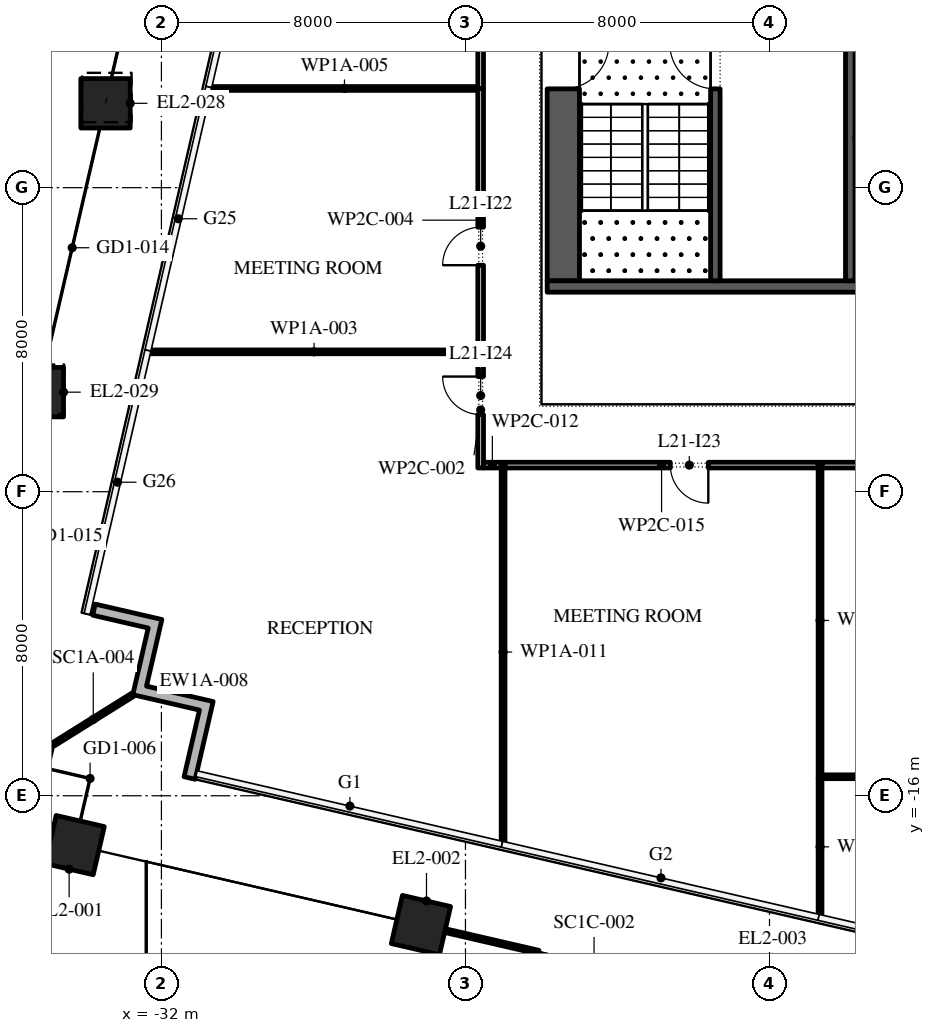
"""IFC4 building model, lengths in metres.
Left out: names, types, materials, properties, quantities, classifications, styles, units other than length and angle.
Written with IfcOpenShell. Run it as: python <this file> out.ifc"""

import sys

from ifc_helpers import new_model, si_unit, direction, frame, frame_2d, origin, origin_2d, place, context, subcontext, project, spatial, polyline, rectangle, outline, extrude, element, fill, save


model = new_model("IFC4")
c1 = context("Model", 3, precision=1e-05, world=origin(), true_north=direction((0.0, 1.0)))
c2 = subcontext(c1, "Body", "Model", "MODEL_VIEW")
j1 = project(units=[si_unit("LENGTHUNIT", "METRE"), si_unit("PLANEANGLEUNIT", "RADIAN")], contexts=[c1])
p1 = place(None, origin())
s1 = spatial("IfcSite", under=j1, at=p1, CompositionType="ELEMENT")
p2 = place(p1, origin())
s2 = spatial("IfcBuilding", under=s1, at=p2, CompositionType="ELEMENT")
p3 = place(p2, frame((0.0, 0.0, 99.6)))
s3 = spatial("IfcBuildingStorey", under=s2, at=p3, CompositionType="ELEMENT", Elevation=99.6)
for number, where, z_axis, x_axis in (
    (1, (-34.282, -17.298, 0.0), (0.0, 0.0, 1.0), (0.974, -0.225, 0.0)),
    (2, (-25.172, -19.402, 0.0), (0.0, 0.0, 1.0), (0.974, -0.225, 0.0)),
):
    element("IfcColumn", number, at=place(p3, frame(where, z_axis=z_axis, x_axis=x_axis)), inside=s3, PredefinedType="COLUMN", context=c2, shape_type="SweptSolid", body=[
        extrude(rectangle(XDim=1.3, YDim=1.3, at=origin_2d()), origin(), (0.0, 0.0, 1.0), 6.0),
    ])
p4 = place(p3, frame((-33.471, 2.219, 0.0), z_axis=(0.005816723784, 0.025300714639, 0.999662962985), x_axis=(-0.974575718587, 0.224058404755, 0.0)))
e3 = element("IfcColumn", 3, at=p4, inside=s3, PredefinedType="COLUMN", context=c2, shape_type="SweptSolid", body=[
    extrude(rectangle(XDim=1.3, YDim=1.3, at=origin_2d()), origin(), (0.0, 0.0, 1.0), 6.002),
])
p5 = place(p3, frame((-35.225, -5.381, 0.0), z_axis=(0.002929440379, 0.012653554971, 0.999915649405), x_axis=(-0.974232565058, 0.225545802843, 0.0)))
e4 = element("IfcColumn", 4, at=p5, inside=s3, PredefinedType="COLUMN", context=c2, shape_type="SweptSolid", body=[
    extrude(rectangle(XDim=1.3, YDim=1.3, at=origin_2d()), origin(), (0.0, 0.0, 1.0), 6.0),
])
p6 = place(p3, frame((-35.631, -15.139, 0.0), z_axis=(0.0, 0.0, 1.0), x_axis=(0.974370064785, -0.224951054344, 0.0)))
e5 = element("IfcColumn", 5, at=p6, inside=s3, PredefinedType="COLUMN", context=c2, shape_type="SweptSolid", body=[
    extrude(rectangle(XDim=1.3, YDim=1.3, at=origin_2d()), origin(), (0.0, 0.0, 1.0), 6.0),
])
p7 = place(p3, origin())
e6 = element("IfcWall", 6, at=p7, inside=s3, PredefinedType="STANDARD", context=c2, shape_type="SweptSolid", body=[
    extrude(outline(polyline([(-32.393, -13.116), (-30.639, -13.521), (-31.111, -15.567), (-31.404, -15.5), (-30.999, -13.746), (-32.753, -13.341), (-32.348, -11.587), (-33.809, -11.25), (-33.742, -10.957), (-31.988, -11.362), (-32.393, -13.116)])), origin(), (0.0, 0.0, 1.0), 5.8),
])
p8 = place(p3, frame((-32.753, -13.341, 0.0), z_axis=(0.0, 0.0, 1.0), x_axis=(-0.848059759764, -0.529900598103, 0.0)))
e7 = element("IfcWall", 7, at=p8, inside=s3, PredefinedType="STANDARD", context=c2, shape_type="SweptSolid", body=[
    extrude(rectangle(XDim=2.455, YDim=0.1, at=frame_2d((1.228, 0.0))), origin(), (0.0, 0.0, 1.0), 5.8),
])
p9 = place(p3, frame((-24.519, -19.552, 0.0), z_axis=(0.0, 0.0, 1.0), x_axis=(0.974372699143, -0.224939643383, 0.0)))
e8 = element("IfcWall", 8, at=p9, inside=s3, PredefinedType="STANDARD", context=c2, shape_type="SweptSolid", body=[
    extrude(rectangle(XDim=8.01, YDim=0.1, at=frame_2d((4.005, 0.0))), origin(), (0.0, 0.0, 1.0), 4.85),
])
p10 = place(p9, frame((2.505, 0.0, 0.0)))
e9 = element("IfcOpeningElement", 9, at=p10, cuts=e8, PredefinedType="OPENING", context=c2, shape_type="SweptSolid", body=[
    extrude(rectangle(XDim=3.0, YDim=3.5, at=frame_2d((1.5, 1.75))), frame((0.0, 0.06, 0.0), z_axis=(0.0, -1.0, 0.0), x_axis=(1.0, 0.0, 0.0)), (0.0, 0.0, 1.0), 0.12),
])
p11 = place(p3, frame((-21.425, -2.45, 0.0), z_axis=(0.0, 0.0, 1.0), x_axis=(0.0, 1.0, 0.0)))
e10 = element("IfcWall", 10, at=p11, inside=s3, PredefinedType="SHEAR", context=c2, shape_type="SweptSolid", body=[
    extrude(rectangle(XDim=27.9, YDim=0.85, at=frame_2d((13.95, 0.0))), origin(), (0.0, 0.0, 1.0), 5.8),
])
p12 = place(p11, frame((5.05, 0.0, 0.0)))
e11 = element("IfcOpeningElement", 11, at=p12, cuts=e10, PredefinedType="OPENING", context=c2, shape_type="SweptSolid", body=[
    extrude(rectangle(XDim=1.2, YDim=2.1, at=frame_2d((0.6, 1.05))), frame((0.0, 0.435, 0.0), z_axis=(0.0, -1.0, 0.0), x_axis=(1.0, 0.0, 0.0)), (0.0, 0.0, 1.0), 0.87),
])
p13 = place(p11, frame((21.65, 0.0, 0.0)))
e12 = element("IfcOpeningElement", 12, at=p13, cuts=e10, PredefinedType="OPENING", context=c2, shape_type="SweptSolid", body=[
    extrude(rectangle(XDim=1.2, YDim=2.1, at=frame_2d((0.6, 1.05))), frame((0.0, 0.435, 0.0), z_axis=(0.0, -1.0, 0.0), x_axis=(1.0, 0.0, 0.0)), (0.0, 0.0, 1.0), 0.87),
])
p14 = place(p3, frame((-21.85, -2.6, 0.0), z_axis=(0.0, 0.0, 1.0), x_axis=(1.0, 0.0, 0.0)))
e13 = element("IfcWall", 13, at=p14, inside=s3, PredefinedType="SHEAR", context=c2, shape_type="SweptSolid", body=[
    extrude(rectangle(XDim=11.7, YDim=0.3, at=frame_2d((5.85, 0.0))), origin(), (0.0, 0.0, 1.0), 5.8),
])
p15 = place(p3, frame((-17.425, -2.45, 0.0), z_axis=(0.0, 0.0, 1.0), x_axis=(0.0, 1.0, 0.0)))
e14 = element("IfcWall", 14, at=p15, inside=s3, PredefinedType="SHEAR", context=c2, shape_type="SweptSolid", body=[
    extrude(rectangle(XDim=6.3, YDim=0.25, at=frame_2d((3.15, 0.0))), origin(), (0.0, 0.0, 1.0), 5.8),
])
p16 = place(p15, frame((5.05, 0.0, 0.0)))
e15 = element("IfcOpeningElement", 15, at=p16, cuts=e14, PredefinedType="OPENING", context=c2, shape_type="SweptSolid", body=[
    extrude(rectangle(XDim=1.2, YDim=2.1, at=frame_2d((0.6, 1.05))), frame((0.0, 0.135, 0.0), z_axis=(0.0, -1.0, 0.0), x_axis=(1.0, 0.0, 0.0)), (0.0, 0.0, 1.0), 0.27),
])
p17 = place(p3, frame((-13.875, -2.45, 0.0), z_axis=(0.0, 0.0, 1.0), x_axis=(0.0, 1.0, 0.0)))
e16 = element("IfcWall", 16, at=p17, inside=s3, PredefinedType="SHEAR", context=c2, shape_type="SweptSolid", body=[
    extrude(rectangle(XDim=21.3, YDim=0.25, at=frame_2d((10.65, 0.0))), origin(), (0.0, 0.0, 1.0), 5.8),
])
p18 = place(p17, frame((11.446, 0.0, 0.0)))
e17 = element("IfcOpeningElement", 17, at=p18, cuts=e16, PredefinedType="OPENING", context=c2, shape_type="SweptSolid", body=[
    extrude(rectangle(XDim=0.9, YDim=2.1, at=frame_2d((0.45, 1.05))), frame((0.0, 0.135, 0.0), z_axis=(0.0, -1.0, 0.0), x_axis=(1.0, 0.0, 0.0)), (0.0, 0.0, 1.0), 0.27),
])
p19 = place(p17, frame((17.725, 0.0, 0.0)))
e18 = element("IfcOpeningElement", 18, at=p19, cuts=e16, PredefinedType="OPENING", context=c2, shape_type="SweptSolid", body=[
    extrude(rectangle(XDim=0.9, YDim=2.1, at=frame_2d((0.45, 1.05))), frame((0.0, 0.135, 0.0), z_axis=(0.0, -1.0, 0.0), x_axis=(1.0, 0.0, 0.0)), (0.0, 0.0, 1.0), 0.27),
])
p20 = place(p17, frame((6.971, 0.0, 0.0)))
e19 = element("IfcOpeningElement", 19, at=p20, cuts=e16, PredefinedType="OPENING", context=c2, shape_type="SweptSolid", body=[
    extrude(rectangle(XDim=1.1, YDim=2.1, at=frame_2d((0.55, 1.05))), frame((0.0, 0.135, 0.0), z_axis=(0.0, -1.0, 0.0), x_axis=(1.0, 0.0, 0.0)), (0.0, 0.0, 1.0), 0.27),
])
p21 = place(p3, frame((-13.75, 1.3, 0.0), z_axis=(0.0, 0.0, 1.0), x_axis=(1.0, 0.0, 0.0)))
e20 = element("IfcWall", 20, at=p21, inside=s3, PredefinedType="PARTITIONING", context=c2, shape_type="SweptSolid", body=[
    extrude(rectangle(XDim=2.75, YDim=0.15, at=frame_2d((1.375, 0.0))), origin(), (0.0, 0.0, 1.0), 5.8),
])
p22 = place(p3, frame((-23.6, -7.375, 0.0), z_axis=(0.0, 0.0, 1.0), x_axis=(0.0, 1.0, 0.0)))
e21 = element("IfcWall", 21, at=p22, inside=s3, PredefinedType="PARTITIONING", context=c2, shape_type="SweptSolid", body=[
    extrude(rectangle(XDim=3.055, YDim=0.15, at=frame_2d((1.527, 0.0))), origin(), (0.0, 0.0, 1.0), 5.8),
])
p23 = place(p22, frame((1.405, 0.0, 0.0)))
e22 = element("IfcOpeningElement", 22, at=p23, cuts=e21, PredefinedType="OPENING", context=c2, shape_type="SweptSolid", body=[
    extrude(rectangle(XDim=1.0, YDim=2.1, at=frame_2d((0.5, 1.05))), frame((0.0, 0.085, 0.0), z_axis=(0.0, -1.0, 0.0), x_axis=(1.0, 0.0, 0.0)), (0.0, 0.0, 1.0), 0.17),
])
p24 = place(p3, frame((-23.675, -4.32, 0.0), z_axis=(0.0, 0.0, 1.0), x_axis=(-1.0, 0.0, 0.0)))
e23 = element("IfcWall", 23, at=p24, inside=s3, PredefinedType="PARTITIONING", context=c2, shape_type="SweptSolid", body=[
    extrude(rectangle(XDim=8.617, YDim=0.1, at=frame_2d((4.309, 0.0))), origin(), (0.0, 0.0, 1.0), 5.8),
])
p25 = place(p3, frame((-23.6, -4.32, 0.0), z_axis=(0.0, 0.0, 1.0), x_axis=(0.0, 1.0, 0.0)))
e24 = element("IfcWall", 24, at=p25, inside=s3, PredefinedType="PARTITIONING", context=c2, shape_type="SweptSolid", body=[
    extrude(rectangle(XDim=6.93, YDim=0.15, at=frame_2d((3.465, 0.0))), origin(), (0.0, 0.0, 1.0), 5.8),
])
p26 = place(p25, frame((2.28, 0.0, 0.0)))
e25 = element("IfcOpeningElement", 25, at=p26, cuts=e24, PredefinedType="OPENING", context=c2, shape_type="SweptSolid", body=[
    extrude(rectangle(XDim=1.0, YDim=2.1, at=frame_2d((0.5, 1.05))), frame((0.0, 0.085, 0.0), z_axis=(0.0, -1.0, 0.0), x_axis=(1.0, 0.0, 0.0)), (0.0, 0.0, 1.0), 0.17),
])
p27 = place(p3, frame((-23.675, 2.61, 0.0), z_axis=(0.0, 0.0, 1.0), x_axis=(-1.0, 0.0, 0.0)))
e26 = element("IfcWall", 26, at=p27, inside=s3, PredefinedType="PARTITIONING", context=c2, shape_type="SweptSolid", body=[
    extrude(rectangle(XDim=7.017, YDim=0.1, at=frame_2d((3.508, 0.0))), origin(), (0.0, 0.0, 1.0), 5.8),
])
p28 = place(p3, frame((-23.6, 2.61, 0.0), z_axis=(0.0, 0.0, 1.0), x_axis=(0.0, 1.0, 0.0)))
e27 = element("IfcWall", 27, at=p28, inside=s3, PredefinedType="PARTITIONING", context=c2, shape_type="SweptSolid", body=[
    extrude(rectangle(XDim=13.92, YDim=0.15, at=frame_2d((6.96, 0.0))), origin(), (0.0, 0.0, 1.0), 5.8),
])
p29 = place(p28, frame((7.72, 0.0, 0.0)))
e28 = element("IfcOpeningElement", 28, at=p29, cuts=e27, PredefinedType="OPENING", context=c2, shape_type="SweptSolid", body=[
    extrude(rectangle(XDim=1.0, YDim=2.1, at=frame_2d((0.5, 1.05))), frame((0.0, 0.085, 0.0), z_axis=(0.0, -1.0, 0.0), x_axis=(1.0, 0.0, 0.0)), (0.0, 0.0, 1.0), 0.17),
])
p30 = place(p3, frame((-23.01, -17.212, 0.0), z_axis=(0.0, 0.0, 1.0), x_axis=(0.0, 1.0, 0.0)))
e29 = element("IfcWall", 29, at=p30, inside=s3, PredefinedType="PARTITIONING", context=c2, shape_type="SweptSolid", body=[
    extrude(rectangle(XDim=9.987, YDim=0.1, at=frame_2d((4.993, 0.0))), origin(), (0.0, 0.0, 1.0), 5.8),
])
p31 = place(p3, frame((-23.06, -7.3, 0.0), z_axis=(0.0, 0.0, 1.0), x_axis=(-1.0, 0.0, 0.0)))
e30 = element("IfcWall", 30, at=p31, inside=s3, PredefinedType="PARTITIONING", context=c2, shape_type="SweptSolid", body=[
    extrude(rectangle(XDim=0.465, YDim=0.15, at=frame_2d((0.232, 0.0))), origin(), (0.0, 0.0, 1.0), 5.8),
])
p32 = place(p3, frame((-14.67, -19.138, 0.0), z_axis=(0.0, 0.0, 1.0), x_axis=(0.0, 1.0, 0.0)))
e31 = element("IfcWall", 31, at=p32, inside=s3, PredefinedType="PARTITIONING", context=c2, shape_type="SweptSolid", body=[
    extrude(rectangle(XDim=3.588, YDim=0.1, at=frame_2d((1.794, 0.0))), origin(), (0.0, 0.0, 1.0), 5.8),
])
p33 = place(p3, frame((-14.67, -15.55, 0.0), z_axis=(0.0, 0.0, 1.0), x_axis=(0.0, 1.0, 0.0)))
e32 = element("IfcWall", 32, at=p33, inside=s3, PredefinedType="PARTITIONING", context=c2, shape_type="SweptSolid", body=[
    extrude(rectangle(XDim=8.325, YDim=0.1, at=frame_2d((4.163, 0.0))), origin(), (0.0, 0.0, 1.0), 5.8),
])
p34 = place(p3, frame((-14.72, -7.3, 0.0), z_axis=(0.0, 0.0, 1.0), x_axis=(-1.0, 0.0, 0.0)))
e33 = element("IfcWall", 33, at=p34, inside=s3, PredefinedType="PARTITIONING", context=c2, shape_type="SweptSolid", body=[
    extrude(rectangle(XDim=8.24, YDim=0.15, at=frame_2d((4.12, 0.0))), origin(), (0.0, 0.0, 1.0), 5.8),
])
p35 = place(p34, frame((2.89, 0.0, 0.0)))
e34 = element("IfcOpeningElement", 34, at=p35, cuts=e33, PredefinedType="OPENING", context=c2, shape_type="SweptSolid", body=[
    extrude(rectangle(XDim=1.0, YDim=2.1, at=frame_2d((0.5, 1.05))), frame((0.0, 0.085, 0.0), z_axis=(0.0, -1.0, 0.0), x_axis=(1.0, 0.0, 0.0)), (0.0, 0.0, 1.0), 0.17),
])
p36 = place(p3, frame((-8.325, -7.3, 0.0), z_axis=(0.0, 0.0, 1.0), x_axis=(-1.0, 0.0, 0.0)))
e35 = element("IfcWall", 35, at=p36, inside=s3, PredefinedType="PARTITIONING", context=c2, shape_type="SweptSolid", body=[
    extrude(rectangle(XDim=6.295, YDim=0.15, at=frame_2d((3.147, 0.0))), origin(), (0.0, 0.0, 1.0), 5.8),
])
p37 = place(p3, frame((-6.29, -15.5, 0.0), z_axis=(0.0, 0.0, 1.0), x_axis=(-1.0, 0.0, 0.0)))
e36 = element("IfcWall", 36, at=p37, inside=s3, PredefinedType="PARTITIONING", context=c2, shape_type="SweptSolid", body=[
    extrude(rectangle(XDim=8.33, YDim=0.1, at=frame_2d((4.165, 0.0))), origin(), (0.0, 0.0, 1.0), 5.8),
])
p38 = place(p37, frame((3.78, 0.0, 0.0)))
e37 = element("IfcOpeningElement", 37, at=p38, cuts=e36, PredefinedType="OPENING", context=c2, shape_type="SweptSolid", body=[
    extrude(rectangle(XDim=0.9, YDim=2.1, at=frame_2d((0.45, 1.05))), frame((0.0, 0.06, 0.0), z_axis=(0.0, -1.0, 0.0), x_axis=(1.0, 0.0, 0.0)), (0.0, 0.0, 1.0), 0.12),
])
p39 = place(p10, origin())
e38 = element("IfcDoor", 38, at=p39, inside=s3, OperationType="DOUBLE_DOOR_SLIDING", PredefinedType="DOOR", context=c2, shape_type="SweptSolid", body=[
    extrude(rectangle(XDim=3.0, YDim=3.5, at=frame_2d((1.5, 1.75))), frame((0.0, 0.025, 0.0), z_axis=(0.0, -1.0, 0.0), x_axis=(1.0, 0.0, 0.0)), (0.0, 0.0, 1.0), 0.05),
])
fill(e9, e38)
p40 = place(p16, origin())
e39 = element("IfcDoor", 39, at=p40, inside=s3, OperationType="SINGLE_SWING_LEFT", PredefinedType="DOOR", context=c2, shape_type="SweptSolid", body=[
    extrude(rectangle(XDim=1.2, YDim=2.1, at=frame_2d((0.6, 1.05))), frame((0.0, 0.025, 0.0), z_axis=(0.0, -1.0, 0.0), x_axis=(1.0, 0.0, 0.0)), (0.0, 0.0, 1.0), 0.05),
])
fill(e15, e39)
p41 = place(p12, frame((1.2, 0.0, 0.0), z_axis=(0.0, 0.0, 1.0), x_axis=(-1.0, 0.0, 0.0)))
e40 = element("IfcDoor", 40, at=p41, inside=s3, OperationType="SINGLE_SWING_RIGHT", PredefinedType="DOOR", context=c2, shape_type="SweptSolid", body=[
    extrude(rectangle(XDim=1.2, YDim=2.1, at=frame_2d((0.6, 1.05))), frame((0.0, 0.025, 0.0), z_axis=(0.0, -1.0, 0.0), x_axis=(1.0, 0.0, 0.0)), (0.0, 0.0, 1.0), 0.05),
])
fill(e11, e40)
p42 = place(p26, origin())
e41 = element("IfcDoor", 41, at=p42, inside=s3, OperationType="SINGLE_SWING_RIGHT", PredefinedType="DOOR", context=c2, shape_type="SweptSolid", body=[
    extrude(rectangle(XDim=1.0, YDim=2.1, at=frame_2d((0.5, 1.05))), frame((0.0, 0.025, 0.0), z_axis=(0.0, -1.0, 0.0), x_axis=(1.0, 0.0, 0.0)), (0.0, 0.0, 1.0), 0.05),
])
fill(e25, e41)
p43 = place(p35, origin())
e42 = element("IfcDoor", 42, at=p43, inside=s3, OperationType="SINGLE_SWING_RIGHT", PredefinedType="DOOR", context=c2, shape_type="SweptSolid", body=[
    extrude(rectangle(XDim=1.0, YDim=2.1, at=frame_2d((0.5, 1.05))), frame((0.0, 0.025, 0.0), z_axis=(0.0, -1.0, 0.0), x_axis=(1.0, 0.0, 0.0)), (0.0, 0.0, 1.0), 0.05),
])
fill(e34, e42)
p44 = place(p23, origin())
e43 = element("IfcDoor", 43, at=p44, inside=s3, OperationType="SINGLE_SWING_LEFT", PredefinedType="DOOR", context=c2, shape_type="SweptSolid", body=[
    extrude(rectangle(XDim=1.0, YDim=2.1, at=frame_2d((0.5, 1.05))), frame((0.0, 0.025, 0.0), z_axis=(0.0, -1.0, 0.0), x_axis=(1.0, 0.0, 0.0)), (0.0, 0.0, 1.0), 0.05),
])
fill(e22, e43)
save(model, sys.argv[1])
